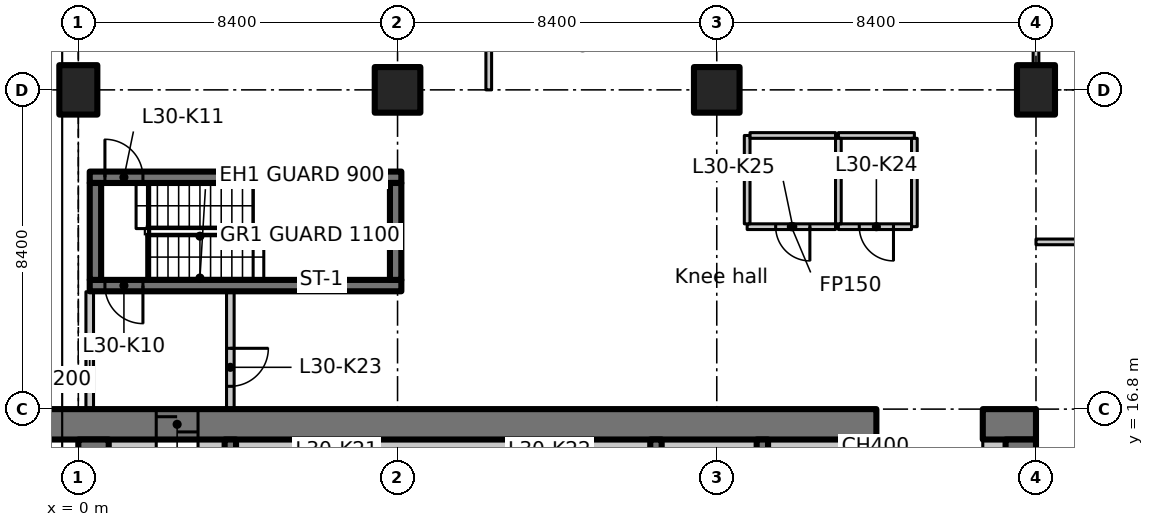
"""IFC4 building model, lengths in metres.
Left out: names, types, materials, properties, quantities, classifications, styles, units other than length and angle.
Written with IfcOpenShell. Run it as: python <this file> out.ifc"""

import sys

from ifc_helpers import new_model, si_unit, direction, frame, frame_2d, origin, origin_2d, place, context, subcontext, project, spatial, polyline, rectangle, outline, extrude, element, fill, save


model = new_model("IFC4")
c1 = context("Model", 3, precision=1e-05, world=origin(), true_north=direction((0.0, 1.0)))
c2 = subcontext(c1, "Body", "Model", "MODEL_VIEW")
j1 = project(units=[si_unit("LENGTHUNIT", "METRE"), si_unit("PLANEANGLEUNIT", "RADIAN")], contexts=[c1])
p1 = place(None, origin())
s1 = spatial("IfcSite", under=j1, at=p1, CompositionType="ELEMENT")
p2 = place(p1, origin())
s2 = spatial("IfcBuilding", under=s1, at=p2, CompositionType="ELEMENT")
p3 = place(p2, frame((0.0, 0.0, 124.1)))
s3 = spatial("IfcBuildingStorey", under=s2, at=p3, CompositionType="ELEMENT", Elevation=124.1)
p4 = place(p3, frame((0.0, 25.2, 0.0), z_axis=(0.0, 0.0, 1.0), x_axis=(1.0, 0.0, 0.0)))
e1 = element("IfcColumn", 1, at=p4, inside=s3, PredefinedType="COLUMN", context=c2, shape_type="SweptSolid", body=[
    extrude(rectangle(XDim=1.0, YDim=1.3, at=origin_2d()), origin(), (0.0, 0.0, 1.0), 3.35),
])
for number, where, z_axis, x_axis in (
    (2, (8.4, 25.2, 0.0), (0.0, 0.0, 1.0), (1.0, 0.0, 0.0)),
    (3, (16.8, 25.2, 0.0), (0.0, 0.0, 1.0), (1.0, 0.0, 0.0)),
):
    element("IfcColumn", number, at=place(p3, frame(where, z_axis=z_axis, x_axis=x_axis)), inside=s3, PredefinedType="COLUMN", context=c2, shape_type="SweptSolid", body=[
        extrude(rectangle(XDim=1.2, YDim=1.2, at=origin_2d()), origin(), (0.0, 0.0, 1.0), 3.35),
    ])
p5 = place(p3, frame((25.2, 25.2, 0.0), z_axis=(0.0, 0.0, 1.0), x_axis=(1.0, 0.0, 0.0)))
e4 = element("IfcColumn", 4, at=p5, inside=s3, PredefinedType="COLUMN", context=c2, shape_type="SweptSolid", body=[
    extrude(rectangle(XDim=1.0, YDim=1.3, at=origin_2d()), origin(), (0.0, 0.0, 1.0), 3.35),
])
p6 = place(p3, frame((-1.1, 16.4, 0.0), z_axis=(0.0, 0.0, 1.0), x_axis=(1.0, 0.0, 0.0)))
e5 = element("IfcWall", 5, at=p6, inside=s3, PredefinedType="SHEAR", context=c2, shape_type="SweptSolid", body=[
    extrude(rectangle(XDim=22.1, YDim=0.8, at=frame_2d((11.05, 0.0))), origin(), (0.0, 0.0, 1.0), 3.35),
])
p7 = place(p6, frame((3.15, 0.0, 0.0)))
e6 = element("IfcOpeningElement", 6, at=p7, cuts=e5, PredefinedType="OPENING", context=c2, shape_type="SweptSolid", body=[
    extrude(rectangle(XDim=1.1, YDim=2.3, at=frame_2d((0.55, 1.15))), frame((0.0, 0.41, 0.0), z_axis=(0.0, -1.0, 0.0), x_axis=(1.0, 0.0, 0.0)), (0.0, 0.0, 1.0), 0.82),
])
p8 = place(p3, frame((23.8, 16.4, 0.0), z_axis=(0.0, 0.0, 1.0), x_axis=(1.0, 0.0, 0.0)))
e7 = element("IfcWall", 7, at=p8, inside=s3, PredefinedType="SHEAR", context=c2, shape_type="SweptSolid", body=[
    extrude(rectangle(XDim=1.4, YDim=0.8, at=frame_2d((0.7, 0.0))), origin(), (0.0, 0.0, 1.0), 3.35),
])
p9 = place(p3, frame((0.4, 7.136, 0.0), z_axis=(0.0, 0.0, 1.0), x_axis=(0.0, 1.0, 0.0)))
e8 = element("IfcWall", 8, at=p9, inside=s3, PredefinedType="SHEAR", context=c2, shape_type="SweptSolid", body=[
    extrude(rectangle(XDim=8.864, YDim=0.8, at=frame_2d((4.432, 0.0))), origin(), (0.0, 0.0, 1.0), 3.35),
])
p10 = place(p3, frame((24.8, 12.6, 0.0), z_axis=(0.0, 0.0, 1.0), x_axis=(0.0, 1.0, 0.0)))
e9 = element("IfcWall", 9, at=p10, inside=s3, PredefinedType="SHEAR", context=c2, shape_type="SweptSolid", body=[
    extrude(rectangle(XDim=3.4, YDim=0.8, at=frame_2d((1.7, 0.0))), origin(), (0.0, 0.0, 1.0), 3.35),
])
p11 = place(p3, frame((0.8, 15.8, 0.0), z_axis=(0.0, 0.0, 1.0), x_axis=(1.0, 0.0, 0.0)))
e10 = element("IfcWall", 10, at=p11, inside=s3, PredefinedType="PARTITIONING", context=c2, shape_type="SweptSolid", body=[
    extrude(rectangle(XDim=1.25, YDim=0.4, at=frame_2d((0.625, 0.0))), origin(), (0.0, 0.0, 1.0), 3.35),
])
p12 = place(p3, frame((23.8, 15.8, 0.0), z_axis=(0.0, 0.0, 1.0), x_axis=(1.0, 0.0, 0.0)))
e11 = element("IfcWall", 11, at=p12, inside=s3, PredefinedType="PARTITIONING", context=c2, shape_type="SweptSolid", body=[
    extrude(rectangle(XDim=0.6, YDim=0.4, at=frame_2d((0.3, 0.0))), origin(), (0.0, 0.0, 1.0), 3.35),
])
for number, where, z_axis, x_axis in (
    (12, (4.0, 12.95, 0.0), (0.0, 0.0, 1.0), (0.0, 1.0, 0.0)),
    (13, (15.2, 12.95, 0.0), (0.0, 0.0, 1.0), (0.0, 1.0, 0.0)),
    (14, (18.0, 12.95, 0.0), (0.0, 0.0, 1.0), (0.0, 1.0, 0.0)),
    (15, (20.8, 12.95, 0.0), (0.0, 0.0, 1.0), (0.0, 1.0, 0.0)),
):
    element("IfcWall", number, at=place(p3, frame(where, z_axis=z_axis, x_axis=x_axis)), inside=s3, PredefinedType="SHEAR", context=c2, shape_type="SweptSolid", body=[
        extrude(rectangle(XDim=3.05, YDim=0.3, at=frame_2d((1.525, 0.0))), origin(), (0.0, 0.0, 1.0), 3.35),
    ])
p13 = place(p3, frame((8.5, 20.05, 0.0), z_axis=(0.0, 0.0, 1.0), x_axis=(-1.0, 0.0, 0.0)))
e16 = element("IfcWall", 16, at=p13, inside=s3, PredefinedType="SHEAR", context=c2, shape_type="SweptSolid", body=[
    extrude(rectangle(XDim=8.2, YDim=0.3, at=frame_2d((4.1, 0.0))), origin(), (0.0, 0.0, 1.0), 3.35),
])
p14 = place(p13, frame((6.8, 0.0, 0.0)))
e17 = element("IfcOpeningElement", 17, at=p14, cuts=e16, PredefinedType="OPENING", context=c2, shape_type="SweptSolid", body=[
    extrude(rectangle(XDim=1.0, YDim=2.1, at=frame_2d((0.5, 1.05))), frame((0.0, 0.16, 0.0), z_axis=(0.0, -1.0, 0.0), x_axis=(1.0, 0.0, 0.0)), (0.0, 0.0, 1.0), 0.32),
])
p15 = place(p3, frame((0.3, 22.9, 0.0), z_axis=(0.0, 0.0, 1.0), x_axis=(1.0, 0.0, 0.0)))
e18 = element("IfcWall", 18, at=p15, inside=s3, PredefinedType="SHEAR", context=c2, shape_type="SweptSolid", body=[
    extrude(rectangle(XDim=8.2, YDim=0.3, at=frame_2d((4.1, 0.0))), origin(), (0.0, 0.0, 1.0), 3.35),
])
p16 = place(p15, frame((0.4, 0.0, 0.0)))
e19 = element("IfcOpeningElement", 19, at=p16, cuts=e18, PredefinedType="OPENING", context=c2, shape_type="SweptSolid", body=[
    extrude(rectangle(XDim=1.0, YDim=2.1, at=frame_2d((0.5, 1.05))), frame((0.0, 0.16, 0.0), z_axis=(0.0, -1.0, 0.0), x_axis=(1.0, 0.0, 0.0)), (0.0, 0.0, 1.0), 0.32),
])
for number, where, z_axis, x_axis in (
    (20, (0.45, 20.2, 0.0), (0.0, 0.0, 1.0), (0.0, 1.0, 0.0)),
    (21, (8.35, 20.2, 0.0), (0.0, 0.0, 1.0), (0.0, 1.0, 0.0)),
):
    element("IfcWall", number, at=place(p3, frame(where, z_axis=z_axis, x_axis=x_axis)), inside=s3, PredefinedType="SHEAR", context=c2, shape_type="SweptSolid", body=[
        extrude(rectangle(XDim=2.55, YDim=0.3, at=frame_2d((1.275, 0.0))), origin(), (0.0, 0.0, 1.0), 3.35),
    ])
p17 = place(p3, frame((0.3, 16.812, 0.0), z_axis=(0.0, 0.0, 1.0), x_axis=(0.0, 1.0, 0.0)))
e22 = element("IfcWall", 22, at=p17, inside=s3, PredefinedType="PARTITIONING", context=c2, shape_type="SweptSolid", body=[
    extrude(rectangle(XDim=3.076, YDim=0.2, at=frame_2d((1.538, 0.0))), origin(), (0.0, 0.0, 1.0), 2.98),
])
p18 = place(p3, frame((4.0, 19.888, 0.0), z_axis=(0.0, 0.0, 1.0), x_axis=(0.0, -1.0, 0.0)))
e23 = element("IfcWall", 23, at=p18, inside=s3, PredefinedType="PARTITIONING", context=c2, shape_type="SweptSolid", body=[
    extrude(rectangle(XDim=3.076, YDim=0.2, at=frame_2d((1.538, 0.0))), origin(), (0.0, 0.0, 1.0), 3.35),
])
p19 = place(p18, frame((1.488, 0.0, 0.0)))
e24 = element("IfcOpeningElement", 24, at=p19, cuts=e23, PredefinedType="OPENING", context=c2, shape_type="SweptSolid", body=[
    extrude(rectangle(XDim=1.0, YDim=2.1, at=frame_2d((0.5, 1.05))), frame((0.0, 0.11, 0.0), z_axis=(0.0, -1.0, 0.0), x_axis=(1.0, 0.0, 0.0)), (0.0, 0.0, 1.0), 0.22),
])
p20 = place(p3, frame((20.0, 24.0, 0.0), z_axis=(0.0, 0.0, 1.0), x_axis=(1.0, 0.0, 0.0)))
e25 = element("IfcWall", 25, at=p20, inside=s3, PredefinedType="PARTITIONING", context=c2, shape_type="SweptSolid", body=[
    extrude(rectangle(XDim=2.0, YDim=0.15, at=frame_2d((1.0, 0.0))), origin(), (0.0, 0.0, 1.0), 3.35),
])
p21 = place(p3, frame((22.0, 23.925, 0.0), z_axis=(0.0, 0.0, 1.0), x_axis=(0.0, -1.0, 0.0)))
e26 = element("IfcWall", 26, at=p21, inside=s3, PredefinedType="PARTITIONING", context=c2, shape_type="SweptSolid", body=[
    extrude(rectangle(XDim=2.325, YDim=0.15, at=frame_2d((1.163, 0.0))), origin(), (0.0, 0.0, 1.0), 3.35),
])
p22 = place(p3, frame((21.925, 21.6, 0.0), z_axis=(0.0, 0.0, 1.0), x_axis=(-1.0, 0.0, 0.0)))
e27 = element("IfcWall", 27, at=p22, inside=s3, PredefinedType="PARTITIONING", context=c2, shape_type="SweptSolid", body=[
    extrude(rectangle(XDim=1.925, YDim=0.15, at=frame_2d((0.962, 0.0))), origin(), (0.0, 0.0, 1.0), 3.35),
])
p23 = place(p22, frame((0.475, 0.0, 0.0)))
e28 = element("IfcOpeningElement", 28, at=p23, cuts=e27, PredefinedType="OPENING", context=c2, shape_type="SweptSolid", body=[
    extrude(rectangle(XDim=0.9, YDim=2.1, at=frame_2d((0.45, 1.05))), frame((0.0, 0.085, 0.0), z_axis=(0.0, -1.0, 0.0), x_axis=(1.0, 0.0, 0.0)), (0.0, 0.0, 1.0), 0.17),
])
p24 = place(p3, frame((20.0, 21.675, 0.0), z_axis=(0.0, 0.0, 1.0), x_axis=(0.0, 1.0, 0.0)))
e29 = element("IfcWall", 29, at=p24, inside=s3, PredefinedType="PARTITIONING", context=c2, shape_type="SweptSolid", body=[
    extrude(rectangle(XDim=2.25, YDim=0.15, at=frame_2d((1.125, 0.0))), origin(), (0.0, 0.0, 1.0), 3.35),
])
p25 = place(p3, frame((19.925, 21.6, 0.0), z_axis=(0.0, 0.0, 1.0), x_axis=(-1.0, 0.0, 0.0)))
e30 = element("IfcWall", 30, at=p25, inside=s3, PredefinedType="PARTITIONING", context=c2, shape_type="SweptSolid", body=[
    extrude(rectangle(XDim=2.325, YDim=0.15, at=frame_2d((1.163, 0.0))), origin(), (0.0, 0.0, 1.0), 3.35),
])
p26 = place(p25, frame((0.675, 0.0, 0.0)))
e31 = element("IfcOpeningElement", 31, at=p26, cuts=e30, PredefinedType="OPENING", context=c2, shape_type="SweptSolid", body=[
    extrude(rectangle(XDim=0.9, YDim=2.1, at=frame_2d((0.45, 1.05))), frame((0.0, 0.085, 0.0), z_axis=(0.0, -1.0, 0.0), x_axis=(1.0, 0.0, 0.0)), (0.0, 0.0, 1.0), 0.17),
])
p27 = place(p3, frame((17.6, 21.675, 0.0), z_axis=(0.0, 0.0, 1.0), x_axis=(0.0, 1.0, 0.0)))
e32 = element("IfcWall", 32, at=p27, inside=s3, PredefinedType="PARTITIONING", context=c2, shape_type="SweptSolid", body=[
    extrude(rectangle(XDim=2.325, YDim=0.15, at=frame_2d((1.163, 0.0))), origin(), (0.0, 0.0, 1.0), 3.35),
])
p28 = place(p3, frame((17.675, 24.0, 0.0), z_axis=(0.0, 0.0, 1.0), x_axis=(1.0, 0.0, 0.0)))
e33 = element("IfcWall", 33, at=p28, inside=s3, PredefinedType="PARTITIONING", context=c2, shape_type="SweptSolid", body=[
    extrude(rectangle(XDim=2.25, YDim=0.15, at=frame_2d((1.125, 0.0))), origin(), (0.0, 0.0, 1.0), 3.35),
])
p29 = place(p3, frame((3.15, 15.8, 0.0), z_axis=(0.0, 0.0, 1.0), x_axis=(1.0, 0.0, 0.0)))
e34 = element("IfcWall", 34, at=p29, inside=s3, PredefinedType="PARTITIONING", context=c2, shape_type="SweptSolid", body=[
    extrude(rectangle(XDim=0.7, YDim=0.4, at=frame_2d((0.35, 0.0))), origin(), (0.0, 0.0, 1.0), 3.35),
])
p30 = place(p3, frame((4.15, 15.8, 0.0), z_axis=(0.0, 0.0, 1.0), x_axis=(1.0, 0.0, 0.0)))
e35 = element("IfcWall", 35, at=p30, inside=s3, PredefinedType="PARTITIONING", context=c2, shape_type="SweptSolid", body=[
    extrude(rectangle(XDim=10.9, YDim=0.4, at=frame_2d((5.45, 0.0))), origin(), (0.0, 0.0, 1.0), 3.35),
])
for number, where, z_axis, x_axis in (
    (36, (15.35, 15.8, 0.0), (0.0, 0.0, 1.0), (1.0, 0.0, 0.0)),
    (37, (18.15, 15.8, 0.0), (0.0, 0.0, 1.0), (1.0, 0.0, 0.0)),
):
    element("IfcWall", number, at=place(p3, frame(where, z_axis=z_axis, x_axis=x_axis)), inside=s3, PredefinedType="PARTITIONING", context=c2, shape_type="SweptSolid", body=[
        extrude(rectangle(XDim=2.5, YDim=0.4, at=frame_2d((1.25, 0.0))), origin(), (0.0, 0.0, 1.0), 3.35),
    ])
p31 = place(p3, frame((20.95, 15.8, 0.0), z_axis=(0.0, 0.0, 1.0), x_axis=(1.0, 0.0, 0.0)))
e38 = element("IfcWall", 38, at=p31, inside=s3, PredefinedType="PARTITIONING", context=c2, shape_type="SweptSolid", body=[
    extrude(rectangle(XDim=0.05, YDim=0.4, at=frame_2d((0.025, 0.0))), origin(), (0.0, 0.0, 1.0), 3.35),
])
p32 = place(p3, frame((25.2, 21.2, 0.0), z_axis=(0.0, 0.0, 1.0), x_axis=(1.0, 0.0, 0.0)))
e39 = element("IfcWall", 39, at=p32, inside=s3, PredefinedType="PARTITIONING", context=c2, shape_type="SweptSolid", body=[
    extrude(rectangle(XDim=4.2, YDim=0.15, at=frame_2d((2.1, 0.0))), origin(), (0.0, 0.0, 1.0), 3.33),
])
p33 = place(p3, frame((25.2, 31.0, 0.0), z_axis=(0.0, 0.0, 1.0), x_axis=(0.0, -1.0, 0.0)))
e40 = element("IfcWall", 40, at=p33, inside=s3, PredefinedType="PARTITIONING", context=c2, shape_type="SweptSolid", body=[
    extrude(outline(polyline([(0.0, 0.0), (5.13, 0.0), (5.13, 2.98), (0.0, 2.98), (0.0, 0.0)])), frame((0.0, 0.075, 0.0), z_axis=(0.0, -1.0, 0.0), x_axis=(1.0, 0.0, 0.0)), (0.0, 0.0, 1.0), 0.15),
])
p34 = place(p33, frame((1.93, 0.0, 0.0)))
e41 = element("IfcOpeningElement", 41, at=p34, cuts=e40, PredefinedType="OPENING", context=c2, shape_type="SweptSolid", body=[
    extrude(rectangle(XDim=1.1, YDim=2.1, at=frame_2d((0.55, 1.05))), frame((0.0, 0.085, 0.0), z_axis=(0.0, -1.0, 0.0), x_axis=(1.0, 0.0, 0.0)), (0.0, 0.0, 1.0), 0.17),
])
p35 = place(p3, frame((10.8, 25.2, 0.0), z_axis=(0.0, 0.0, 1.0), x_axis=(0.0, 1.0, 0.0)))
e42 = element("IfcWall", 42, at=p35, inside=s3, PredefinedType="PARTITIONING", context=c2, shape_type="SweptSolid", body=[
    extrude(rectangle(XDim=8.4, YDim=0.15, at=frame_2d((4.2, 0.0))), origin(), (0.0, 0.0, 1.0), 3.33),
])
p36 = place(p35, frame((3.3, 0.0, 0.0)))
e43 = element("IfcOpeningElement", 43, at=p36, cuts=e42, PredefinedType="OPENING", context=c2, shape_type="SweptSolid", body=[
    extrude(rectangle(XDim=1.6, YDim=2.1, at=frame_2d((0.8, 1.05))), frame((0.0, 0.085, 0.0), z_axis=(0.0, -1.0, 0.0), x_axis=(1.0, 0.0, 0.0)), (0.0, 0.0, 1.0), 0.17),
])
p37 = place(p7, origin())
e44 = element("IfcDoor", 44, at=p37, inside=s3, OperationType="SLIDING_TO_LEFT", PredefinedType="DOOR", context=c2, shape_type="SweptSolid", body=[
    extrude(rectangle(XDim=1.1, YDim=2.3, at=frame_2d((0.55, 1.15))), frame((0.0, 0.025, 0.0), z_axis=(0.0, -1.0, 0.0), x_axis=(1.0, 0.0, 0.0)), (0.0, 0.0, 1.0), 0.05),
])
fill(e6, e44)
p38 = place(p14, origin())
e45 = element("IfcDoor", 45, at=p38, inside=s3, OperationType="SINGLE_SWING_LEFT", PredefinedType="DOOR", context=c2, shape_type="SweptSolid", body=[
    extrude(rectangle(XDim=1.0, YDim=2.1, at=frame_2d((0.5, 1.05))), frame((0.0, 0.025, 0.0), z_axis=(0.0, -1.0, 0.0), x_axis=(1.0, 0.0, 0.0)), (0.0, 0.0, 1.0), 0.05),
])
fill(e17, e45)
p39 = place(p16, origin())
e46 = element("IfcDoor", 46, at=p39, inside=s3, OperationType="SINGLE_SWING_RIGHT", PredefinedType="DOOR", context=c2, shape_type="SweptSolid", body=[
    extrude(rectangle(XDim=1.0, YDim=2.1, at=frame_2d((0.5, 1.05))), frame((0.0, 0.025, 0.0), z_axis=(0.0, -1.0, 0.0), x_axis=(1.0, 0.0, 0.0)), (0.0, 0.0, 1.0), 0.05),
])
fill(e19, e46)
p40 = place(p19, origin())
e47 = element("IfcDoor", 47, at=p40, inside=s3, OperationType="SINGLE_SWING_RIGHT", PredefinedType="DOOR", context=c2, shape_type="SweptSolid", body=[
    extrude(rectangle(XDim=1.0, YDim=2.1, at=frame_2d((0.5, 1.05))), frame((0.0, 0.025, 0.0), z_axis=(0.0, -1.0, 0.0), x_axis=(1.0, 0.0, 0.0)), (0.0, 0.0, 1.0), 0.05),
])
fill(e24, e47)
p41 = place(p23, origin())
e48 = element("IfcDoor", 48, at=p41, inside=s3, OperationType="SINGLE_SWING_LEFT", PredefinedType="DOOR", context=c2, shape_type="SweptSolid", body=[
    extrude(rectangle(XDim=0.9, YDim=2.1, at=frame_2d((0.45, 1.05))), frame((0.0, 0.025, 0.0), z_axis=(0.0, -1.0, 0.0), x_axis=(1.0, 0.0, 0.0)), (0.0, 0.0, 1.0), 0.05),
])
fill(e28, e48)
p42 = place(p26, origin())
e49 = element("IfcDoor", 49, at=p42, inside=s3, OperationType="SINGLE_SWING_RIGHT", PredefinedType="DOOR", context=c2, shape_type="SweptSolid", body=[
    extrude(rectangle(XDim=0.9, YDim=2.1, at=frame_2d((0.45, 1.05))), frame((0.0, 0.025, 0.0), z_axis=(0.0, -1.0, 0.0), x_axis=(1.0, 0.0, 0.0)), (0.0, 0.0, 1.0), 0.05),
])
fill(e31, e49)
save(model, sys.argv[1])
